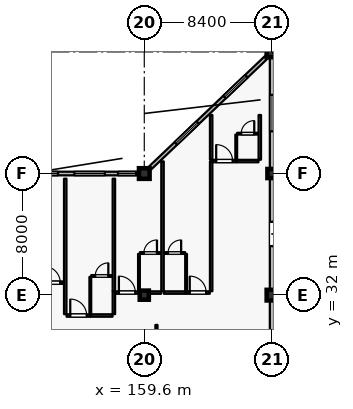
"""IFC4 building model, lengths in metres.
Left out: names, types, materials, properties, quantities, classifications, styles, units other than length and angle.
Written with IfcOpenShell. Run it as: python <this file> out.ifc"""

import sys

from ifc_helpers import new_model, si_unit, direction, frame, frame_2d, origin, origin_2d, place, context, subcontext, project, spatial, rectangle, extrude, element, fill, save


model = new_model("IFC4")
c1 = context("Model", 3, precision=1e-05, world=origin(), true_north=direction((0.0, 1.0)))
c2 = subcontext(c1, "Body", "Model", "MODEL_VIEW")
j1 = project(units=[si_unit("LENGTHUNIT", "METRE"), si_unit("PLANEANGLEUNIT", "RADIAN")], contexts=[c1])
p1 = place(None, origin())
s1 = spatial("IfcSite", under=j1, at=p1, CompositionType="ELEMENT")
p2 = place(p1, origin())
s2 = spatial("IfcBuilding", under=s1, at=p2, CompositionType="ELEMENT")
p3 = place(p2, frame((0.0, 0.0, 36.0)))
s3 = spatial("IfcBuildingStorey", under=s2, at=p3, CompositionType="ELEMENT", Elevation=36.0)
for number, where, z_axis, x_axis in (
    (1, (159.6, 40.0, 0.0), (0.0, 0.0, 1.0), (1.0, 0.0, 0.0)),
    (2, (168.0, 32.0, 0.0), (0.0, 0.0, 1.0), (1.0, 0.0, 0.0)),
    (3, (168.0, 48.0, 0.0), (0.0, 0.0, 1.0), (1.0, 0.0, 0.0)),
):
    element("IfcColumn", number, at=place(p3, frame(where, z_axis=z_axis, x_axis=x_axis)), inside=s3, PredefinedType="COLUMN", context=c2, shape_type="SweptSolid", body=[
        extrude(rectangle(XDim=0.7, YDim=0.7, at=origin_2d()), origin(), (0.0, 0.0, 1.0), 3.6),
    ])
for number, where, z_axis, x_axis in (
    (4, (159.6, 32.0, 0.0), (0.0, 0.0, 1.0), (1.0, 0.0, 0.0)),
    (5, (168.0, 40.0, 0.0), (0.0, 0.0, 1.0), (1.0, 0.0, 0.0)),
):
    element("IfcColumn", number, at=place(p3, frame(where, z_axis=z_axis, x_axis=x_axis)), inside=s3, PredefinedType="COLUMN", context=c2, shape_type="SweptSolid", body=[
        extrude(rectangle(XDim=0.6, YDim=0.6, at=origin_2d()), origin(), (0.0, 0.0, 1.0), 3.6),
    ])
p4 = place(p3, frame((151.55, 40.0, 0.0), z_axis=(0.0, 0.0, 1.0), x_axis=(1.0, 0.0, 0.0)))
e6 = element("IfcWall", 6, at=p4, inside=s3, PredefinedType="SOLIDWALL", context=c2, shape_type="SweptSolid", body=[
    extrude(rectangle(XDim=7.7, YDim=0.24, at=frame_2d((3.85, 0.0))), origin(), (0.0, 0.0, 1.0), 2.94),
])
p5 = place(p4, frame((0.375, 0.0, 0.8)))
e7 = element("IfcOpeningElement", 7, at=p5, cuts=e6, PredefinedType="OPENING", context=c2, shape_type="SweptSolid", body=[
    extrude(rectangle(XDim=2.0, YDim=1.75, at=frame_2d((1.0, 0.875))), frame((0.0, 0.13, 0.0), z_axis=(0.0, -1.0, 0.0), x_axis=(1.0, 0.0, 0.0)), (0.0, 0.0, 1.0), 0.26),
])
p6 = place(p4, frame((3.45, 0.0, 0.8)))
e8 = element("IfcOpeningElement", 8, at=p6, cuts=e6, PredefinedType="OPENING", context=c2, shape_type="SweptSolid", body=[
    extrude(rectangle(XDim=2.0, YDim=1.75, at=frame_2d((1.0, 0.875))), frame((0.0, 0.13, 0.0), z_axis=(0.0, -1.0, 0.0), x_axis=(1.0, 0.0, 0.0)), (0.0, 0.0, 1.0), 0.26),
])
p7 = place(p4, frame((6.325, 0.0, 0.8)))
e9 = element("IfcOpeningElement", 9, at=p7, cuts=e6, PredefinedType="OPENING", context=c2, shape_type="SweptSolid", body=[
    extrude(rectangle(XDim=1.2, YDim=1.5, at=frame_2d((0.6, 0.75))), frame((0.0, 0.13, 0.0), z_axis=(0.0, -1.0, 0.0), x_axis=(1.0, 0.0, 0.0)), (0.0, 0.0, 1.0), 0.26),
])
p8 = place(p3, frame((159.95, 40.333, 0.0), z_axis=(0.0, 0.0, 1.0), x_axis=(0.724105170588, 0.689689569247, 0.0)))
e10 = element("IfcWall", 10, at=p8, inside=s3, PredefinedType="SOLIDWALL", context=c2, shape_type="SweptSolid", body=[
    extrude(rectangle(XDim=10.634, YDim=0.24, at=frame_2d((5.317, 0.0))), origin(), (0.0, 0.0, 1.0), 2.94),
])
p9 = place(p8, frame((2.383, 0.0, 0.8)))
e11 = element("IfcOpeningElement", 11, at=p9, cuts=e10, PredefinedType="OPENING", context=c2, shape_type="SweptSolid", body=[
    extrude(rectangle(XDim=2.0, YDim=1.75, at=frame_2d((1.0, 0.875))), frame((0.0, 0.13, 0.0), z_axis=(0.0, -1.0, 0.0), x_axis=(1.0, 0.0, 0.0)), (0.0, 0.0, 1.0), 0.26),
])
p10 = place(p8, frame((6.803, 0.0, 0.8)))
e12 = element("IfcOpeningElement", 12, at=p10, cuts=e10, PredefinedType="OPENING", context=c2, shape_type="SweptSolid", body=[
    extrude(rectangle(XDim=2.0, YDim=1.75, at=frame_2d((1.0, 0.875))), frame((0.0, 0.13, 0.0), z_axis=(0.0, -1.0, 0.0), x_axis=(1.0, 0.0, 0.0)), (0.0, 0.0, 1.0), 0.26),
])
p11 = place(p3, frame((168.0, 47.65, 0.0), z_axis=(0.0, 0.0, 1.0), x_axis=(0.0, -1.0, 0.0)))
e13 = element("IfcWall", 13, at=p11, inside=s3, PredefinedType="SOLIDWALL", context=c2, shape_type="SweptSolid", body=[
    extrude(rectangle(XDim=7.35, YDim=0.28, at=frame_2d((3.675, 0.0))), origin(), (0.0, 0.0, 1.0), 2.7),
])
p12 = place(p11, frame((2.475, 0.0, 0.5)))
e14 = element("IfcOpeningElement", 14, at=p12, cuts=e13, PredefinedType="OPENING", context=c2, shape_type="SweptSolid", body=[
    extrude(rectangle(XDim=2.4, YDim=1.65, at=frame_2d((1.2, 0.825))), frame((0.0, 0.15, 0.0), z_axis=(0.0, -1.0, 0.0), x_axis=(1.0, 0.0, 0.0)), (0.0, 0.0, 1.0), 0.3),
])
p13 = place(p3, frame((168.0, 39.7, 0.0), z_axis=(0.0, 0.0, 1.0), x_axis=(0.0, -1.0, 0.0)))
e15 = element("IfcWall", 15, at=p13, inside=s3, PredefinedType="SOLIDWALL", context=c2, shape_type="SweptSolid", body=[
    extrude(rectangle(XDim=7.35, YDim=0.28, at=frame_2d((3.675, 0.0))), origin(), (0.0, 0.0, 1.0), 2.7),
])
p14 = place(p13, frame((2.875, 0.0, 0.0)))
e16 = element("IfcOpeningElement", 16, at=p14, cuts=e15, PredefinedType="OPENING", context=c2, shape_type="SweptSolid", body=[
    extrude(rectangle(XDim=1.6, YDim=2.25, at=frame_2d((0.8, 1.125))), frame((0.0, 0.15, 0.0), z_axis=(0.0, -1.0, 0.0), x_axis=(1.0, 0.0, 0.0)), (0.0, 0.0, 1.0), 0.3),
])
p15 = place(p3, frame((168.0, 31.65, 0.0), z_axis=(0.0, 0.0, 1.0), x_axis=(0.0, -1.0, 0.0)))
e17 = element("IfcWall", 17, at=p15, inside=s3, PredefinedType="SOLIDWALL", context=c2, shape_type="SweptSolid", body=[
    extrude(rectangle(XDim=7.35, YDim=0.28, at=frame_2d((3.675, 0.0))), origin(), (0.0, 0.0, 1.0), 2.7),
])
p16 = place(p15, frame((2.475, 0.0, 0.5)))
e18 = element("IfcOpeningElement", 18, at=p16, cuts=e17, PredefinedType="OPENING", context=c2, shape_type="SweptSolid", body=[
    extrude(rectangle(XDim=2.4, YDim=1.65, at=frame_2d((1.2, 0.825))), frame((0.0, 0.15, 0.0), z_axis=(0.0, -1.0, 0.0), x_axis=(1.0, 0.0, 0.0)), (0.0, 0.0, 1.0), 0.3),
])
p17 = place(p3, frame((152.75, 32.82, 0.0), z_axis=(0.0, 0.0, 1.0), x_axis=(1.0, 0.0, 0.0)))
e19 = element("IfcWall", 19, at=p17, inside=s3, PredefinedType="PARTITIONING", context=c2, shape_type="SweptSolid", body=[
    extrude(rectangle(XDim=1.56, YDim=0.16, at=frame_2d((0.78, 0.0))), origin(), (0.0, 0.0, 1.0), 3.365),
])
p18 = place(p17, frame((0.24, 0.0, 0.0)))
e20 = element("IfcOpeningElement", 20, at=p18, cuts=e19, PredefinedType="OPENING", context=c2, shape_type="SweptSolid", body=[
    extrude(rectangle(XDim=1.08, YDim=2.3, at=frame_2d((0.54, 1.15))), frame((0.0, 0.09, 0.0), z_axis=(0.0, -1.0, 0.0), x_axis=(1.0, 0.0, 0.0)), (0.0, 0.0, 1.0), 0.18),
])
p19 = place(p3, frame((154.49, 30.66, 0.0), z_axis=(0.0, 0.0, 1.0), x_axis=(1.0, 0.0, 0.0)))
e21 = element("IfcWall", 21, at=p19, inside=s3, PredefinedType="PARTITIONING", context=c2, shape_type="SweptSolid", body=[
    extrude(rectangle(XDim=1.56, YDim=0.16, at=frame_2d((0.78, 0.0))), origin(), (0.0, 0.0, 1.0), 3.365),
])
p20 = place(p19, frame((0.24, 0.0, 0.0)))
e22 = element("IfcOpeningElement", 22, at=p20, cuts=e21, PredefinedType="OPENING", context=c2, shape_type="SweptSolid", body=[
    extrude(rectangle(XDim=1.08, YDim=2.3, at=frame_2d((0.54, 1.15))), frame((0.0, 0.09, 0.0), z_axis=(0.0, -1.0, 0.0), x_axis=(1.0, 0.0, 0.0)), (0.0, 0.0, 1.0), 0.18),
])
p21 = place(p3, frame((156.06, 30.66, 0.0), z_axis=(0.0, 0.0, 1.0), x_axis=(1.0, 0.0, 0.0)))
e23 = element("IfcWall", 23, at=p21, inside=s3, PredefinedType="PARTITIONING", context=c2, shape_type="SweptSolid", body=[
    extrude(rectangle(XDim=1.45, YDim=0.16, at=frame_2d((0.725, 0.0))), origin(), (0.0, 0.0, 1.0), 3.365),
])
p22 = place(p3, frame((156.05, 30.75, 0.0), z_axis=(0.0, 0.0, 1.0), x_axis=(0.0, 1.0, 0.0)))
e24 = element("IfcWall", 24, at=p22, inside=s3, PredefinedType="PARTITIONING", context=c2, shape_type="SweptSolid", body=[
    extrude(rectangle(XDim=2.45, YDim=0.115, at=frame_2d((1.225, 0.0))), origin(), (0.0, 0.0, 1.0), 3.365),
])
p23 = place(p3, frame((156.11, 33.26, 0.0), z_axis=(0.0, 0.0, 1.0), x_axis=(1.0, 0.0, 0.0)))
e25 = element("IfcWall", 25, at=p23, inside=s3, PredefinedType="PARTITIONING", context=c2, shape_type="SweptSolid", body=[
    extrude(rectangle(XDim=1.39, YDim=0.115, at=frame_2d((0.695, 0.0))), origin(), (0.0, 0.0, 1.0), 3.365),
])
p24 = place(p23, frame((0.265, 0.0, 0.0)))
e26 = element("IfcOpeningElement", 26, at=p24, cuts=e25, PredefinedType="OPENING", context=c2, shape_type="SweptSolid", body=[
    extrude(rectangle(XDim=0.86, YDim=2.12, at=frame_2d((0.43, 1.06))), frame((0.0, 0.067, 0.0), z_axis=(0.0, -1.0, 0.0), x_axis=(1.0, 0.0, 0.0)), (0.0, 0.0, 1.0), 0.135),
])
p25 = place(p3, frame((154.4, 30.75, 0.0), z_axis=(0.0, 0.0, 1.0), x_axis=(0.0, 1.0, 0.0)))
e27 = element("IfcWall", 27, at=p25, inside=s3, PredefinedType="PARTITIONING", context=c2, shape_type="SweptSolid", body=[
    extrude(rectangle(XDim=8.91, YDim=0.16, at=frame_2d((4.455, 0.0))), origin(), (0.0, 0.0, 1.0), 3.365),
])
p26 = place(p3, frame((157.6, 30.75, 0.0), z_axis=(0.0, 0.0, 1.0), x_axis=(0.0, 1.0, 0.0)))
e28 = element("IfcWall", 28, at=p26, inside=s3, PredefinedType="PARTITIONING", context=c2, shape_type="SweptSolid", body=[
    extrude(rectangle(XDim=1.5, YDim=0.16, at=frame_2d((0.75, 0.0))), origin(), (0.0, 0.0, 1.0), 3.365),
])
p27 = place(p3, frame((157.69, 32.17, 0.0), z_axis=(0.0, 0.0, 1.0), x_axis=(1.0, 0.0, 0.0)))
e29 = element("IfcWall", 29, at=p27, inside=s3, PredefinedType="PARTITIONING", context=c2, shape_type="SweptSolid", body=[
    extrude(rectangle(XDim=1.56, YDim=0.16, at=frame_2d((0.78, 0.0))), origin(), (0.0, 0.0, 1.0), 2.84),
])
p28 = place(p27, frame((0.24, 0.0, 0.0)))
e30 = element("IfcOpeningElement", 30, at=p28, cuts=e29, PredefinedType="OPENING", context=c2, shape_type="SweptSolid", body=[
    extrude(rectangle(XDim=1.08, YDim=2.3, at=frame_2d((0.54, 1.15))), frame((0.0, 0.09, 0.0), z_axis=(0.0, -1.0, 0.0), x_axis=(1.0, 0.0, 0.0)), (0.0, 0.0, 1.0), 0.18),
])
p29 = place(p3, frame((159.26, 32.17, 0.0), z_axis=(0.0, 0.0, 1.0), x_axis=(1.0, 0.0, 0.0)))
e31 = element("IfcWall", 31, at=p29, inside=s3, PredefinedType="PARTITIONING", context=c2, shape_type="SweptSolid", body=[
    extrude(rectangle(XDim=1.45, YDim=0.16, at=frame_2d((0.725, 0.0))), origin(), (0.0, 0.0, 1.0), 3.365),
])
p30 = place(p3, frame((159.25, 32.26, 0.0), z_axis=(0.0, 0.0, 1.0), x_axis=(0.0, 1.0, 0.0)))
e32 = element("IfcWall", 32, at=p30, inside=s3, PredefinedType="PARTITIONING", context=c2, shape_type="SweptSolid", body=[
    extrude(rectangle(XDim=2.45, YDim=0.115, at=frame_2d((1.225, 0.0))), origin(), (0.0, 0.0, 1.0), 3.365),
])
p31 = place(p3, frame((159.31, 34.77, 0.0), z_axis=(0.0, 0.0, 1.0), x_axis=(1.0, 0.0, 0.0)))
e33 = element("IfcWall", 33, at=p31, inside=s3, PredefinedType="PARTITIONING", context=c2, shape_type="SweptSolid", body=[
    extrude(rectangle(XDim=1.39, YDim=0.115, at=frame_2d((0.695, 0.0))), origin(), (0.0, 0.0, 1.0), 3.365),
])
p32 = place(p31, frame((0.265, 0.0, 0.0)))
e34 = element("IfcOpeningElement", 34, at=p32, cuts=e33, PredefinedType="OPENING", context=c2, shape_type="SweptSolid", body=[
    extrude(rectangle(XDim=0.86, YDim=2.12, at=frame_2d((0.43, 1.06))), frame((0.0, 0.067, 0.0), z_axis=(0.0, -1.0, 0.0), x_axis=(1.0, 0.0, 0.0)), (0.0, 0.0, 1.0), 0.135),
])
p33 = place(p3, frame((157.6, 32.26, 0.0), z_axis=(0.0, 0.0, 1.0), x_axis=(0.0, 1.0, 0.0)))
e35 = element("IfcWall", 35, at=p33, inside=s3, PredefinedType="PARTITIONING", context=c2, shape_type="SweptSolid", body=[
    extrude(rectangle(XDim=7.4, YDim=0.16, at=frame_2d((3.7, 0.0))), origin(), (0.0, 0.0, 1.0), 3.365),
])
p34 = place(p3, frame((160.89, 32.17, 0.0), z_axis=(0.0, 0.0, 1.0), x_axis=(1.0, 0.0, 0.0)))
e36 = element("IfcWall", 36, at=p34, inside=s3, PredefinedType="PARTITIONING", context=c2, shape_type="SweptSolid", body=[
    extrude(rectangle(XDim=1.45, YDim=0.16, at=frame_2d((0.725, 0.0))), origin(), (0.0, 0.0, 1.0), 3.365),
])
p35 = place(p3, frame((162.35, 32.17, 0.0), z_axis=(0.0, 0.0, 1.0), x_axis=(1.0, 0.0, 0.0)))
e37 = element("IfcWall", 37, at=p35, inside=s3, PredefinedType="PARTITIONING", context=c2, shape_type="SweptSolid", body=[
    extrude(rectangle(XDim=1.56, YDim=0.16, at=frame_2d((0.78, 0.0))), origin(), (0.0, 0.0, 1.0), 3.365),
])
p36 = place(p35, frame((0.24, 0.0, 0.0)))
e38 = element("IfcOpeningElement", 38, at=p36, cuts=e37, PredefinedType="OPENING", context=c2, shape_type="SweptSolid", body=[
    extrude(rectangle(XDim=1.08, YDim=2.3, at=frame_2d((0.54, 1.15))), frame((0.0, 0.09, 0.0), z_axis=(0.0, -1.0, 0.0), x_axis=(1.0, 0.0, 0.0)), (0.0, 0.0, 1.0), 0.18),
])
p37 = place(p3, frame((162.35, 32.26, 0.0), z_axis=(0.0, 0.0, 1.0), x_axis=(0.0, 1.0, 0.0)))
e39 = element("IfcWall", 39, at=p37, inside=s3, PredefinedType="PARTITIONING", context=c2, shape_type="SweptSolid", body=[
    extrude(rectangle(XDim=2.45, YDim=0.115, at=frame_2d((1.225, 0.0))), origin(), (0.0, 0.0, 1.0), 3.365),
])
p38 = place(p3, frame((160.9, 34.77, 0.0), z_axis=(0.0, 0.0, 1.0), x_axis=(1.0, 0.0, 0.0)))
e40 = element("IfcWall", 40, at=p38, inside=s3, PredefinedType="PARTITIONING", context=c2, shape_type="SweptSolid", body=[
    extrude(rectangle(XDim=1.39, YDim=0.115, at=frame_2d((0.695, 0.0))), origin(), (0.0, 0.0, 1.0), 3.365),
])
p39 = place(p38, frame((0.265, 0.0, 0.0)))
e41 = element("IfcOpeningElement", 41, at=p39, cuts=e40, PredefinedType="OPENING", context=c2, shape_type="SweptSolid", body=[
    extrude(rectangle(XDim=0.86, YDim=2.12, at=frame_2d((0.43, 1.06))), frame((0.0, 0.067, 0.0), z_axis=(0.0, -1.0, 0.0), x_axis=(1.0, 0.0, 0.0)), (0.0, 0.0, 1.0), 0.135),
])
for number, where, z_axis, x_axis in (
    (42, (160.8, 32.26, 0.0), (0.0, 0.0, 1.0), (0.0, 1.0, 0.0)),
    (43, (164.0, 32.26, 0.0), (0.0, 0.0, 1.0), (0.0, 1.0, 0.0)),
):
    element("IfcWall", number, at=place(p3, frame(where, z_axis=z_axis, x_axis=x_axis)), inside=s3, PredefinedType="PARTITIONING", context=c2, shape_type="SweptSolid", body=[
        extrude(rectangle(XDim=8.54, YDim=0.16, at=frame_2d((4.27, 0.0))), origin(), (0.0, 0.0, 1.0), 3.365),
    ])
p40 = place(p3, frame((164.09, 40.82, 0.0), z_axis=(0.0, 0.0, 1.0), x_axis=(1.0, 0.0, 0.0)))
e44 = element("IfcWall", 44, at=p40, inside=s3, PredefinedType="PARTITIONING", context=c2, shape_type="SweptSolid", body=[
    extrude(rectangle(XDim=1.56, YDim=0.16, at=frame_2d((0.78, 0.0))), origin(), (0.0, 0.0, 1.0), 3.365),
])
p41 = place(p40, frame((0.24, 0.0, 0.0)))
e45 = element("IfcOpeningElement", 45, at=p41, cuts=e44, PredefinedType="OPENING", context=c2, shape_type="SweptSolid", body=[
    extrude(rectangle(XDim=1.08, YDim=2.3, at=frame_2d((0.54, 1.15))), frame((0.0, 0.09, 0.0), z_axis=(0.0, -1.0, 0.0), x_axis=(1.0, 0.0, 0.0)), (0.0, 0.0, 1.0), 0.18),
])
p42 = place(p3, frame((165.66, 40.82, 0.0), z_axis=(0.0, 0.0, 1.0), x_axis=(1.0, 0.0, 0.0)))
e46 = element("IfcWall", 46, at=p42, inside=s3, PredefinedType="PARTITIONING", context=c2, shape_type="SweptSolid", body=[
    extrude(rectangle(XDim=1.45, YDim=0.16, at=frame_2d((0.725, 0.0))), origin(), (0.0, 0.0, 1.0), 3.365),
])
p43 = place(p3, frame((165.65, 40.91, 0.0), z_axis=(0.0, 0.0, 1.0), x_axis=(0.0, 1.0, 0.0)))
e47 = element("IfcWall", 47, at=p43, inside=s3, PredefinedType="PARTITIONING", context=c2, shape_type="SweptSolid", body=[
    extrude(rectangle(XDim=1.65, YDim=0.115, at=frame_2d((0.825, 0.0))), origin(), (0.0, 0.0, 1.0), 3.365),
])
p44 = place(p3, frame((165.71, 42.62, 0.0), z_axis=(0.0, 0.0, 1.0), x_axis=(1.0, 0.0, 0.0)))
e48 = element("IfcWall", 48, at=p44, inside=s3, PredefinedType="PARTITIONING", context=c2, shape_type="SweptSolid", body=[
    extrude(rectangle(XDim=1.39, YDim=0.115, at=frame_2d((0.695, 0.0))), origin(), (0.0, 0.0, 1.0), 3.365),
])
p45 = place(p44, frame((0.265, 0.0, 0.0)))
e49 = element("IfcOpeningElement", 49, at=p45, cuts=e48, PredefinedType="OPENING", context=c2, shape_type="SweptSolid", body=[
    extrude(rectangle(XDim=0.86, YDim=2.12, at=frame_2d((0.43, 1.06))), frame((0.0, 0.067, 0.0), z_axis=(0.0, -1.0, 0.0), x_axis=(1.0, 0.0, 0.0)), (0.0, 0.0, 1.0), 0.135),
])
for number, where, z_axis, x_axis in (
    (50, (164.0, 40.91, 0.0), (0.0, 0.0, 1.0), (0.0, 1.0, 0.0)),
    (51, (167.2, 40.91, 0.0), (0.0, 0.0, 1.0), (0.0, 1.0, 0.0)),
):
    element("IfcWall", number, at=place(p3, frame(where, z_axis=z_axis, x_axis=x_axis)), inside=s3, PredefinedType="PARTITIONING", context=c2, shape_type="SweptSolid", body=[
        extrude(rectangle(XDim=2.94, YDim=0.16, at=frame_2d((1.47, 0.0))), origin(), (0.0, 0.0, 1.0), 3.365),
    ])
p46 = place(p3, frame((160.4, 24.96, 0.0), z_axis=(0.0, 0.0, 1.0), x_axis=(0.0, 1.0, 0.0)))
e52 = element("IfcWall", 52, at=p46, inside=s3, PredefinedType="PARTITIONING", context=c2, shape_type="SweptSolid", body=[
    extrude(rectangle(XDim=5.08, YDim=0.14, at=frame_2d((2.54, 0.0))), origin(), (0.0, 0.0, 1.0), 3.365),
])
p47 = place(p46, frame((1.59, 0.0, 0.0)))
e53 = element("IfcOpeningElement", 53, at=p47, cuts=e52, PredefinedType="OPENING", context=c2, shape_type="SweptSolid", body=[
    extrude(rectangle(XDim=1.9, YDim=2.4, at=frame_2d((0.95, 1.2))), frame((0.0, 0.08, 0.0), z_axis=(0.0, -1.0, 0.0), x_axis=(1.0, 0.0, 0.0)), (0.0, 0.0, 1.0), 0.16),
])
p48 = place(p5, origin())
e54 = element("IfcWindow", 54, at=p48, inside=s3, PartitioningType="DOUBLE_PANEL_VERTICAL", PredefinedType="WINDOW", context=c2, shape_type="SweptSolid", body=[
    extrude(rectangle(XDim=2.0, YDim=1.75, at=frame_2d((1.0, 0.875))), frame((0.0, 0.03, 0.0), z_axis=(0.0, -1.0, 0.0), x_axis=(1.0, 0.0, 0.0)), (0.0, 0.0, 1.0), 0.06),
])
fill(e7, e54)
p49 = place(p6, origin())
e55 = element("IfcWindow", 55, at=p49, inside=s3, PartitioningType="DOUBLE_PANEL_VERTICAL", PredefinedType="WINDOW", context=c2, shape_type="SweptSolid", body=[
    extrude(rectangle(XDim=2.0, YDim=1.75, at=frame_2d((1.0, 0.875))), frame((0.0, 0.03, 0.0), z_axis=(0.0, -1.0, 0.0), x_axis=(1.0, 0.0, 0.0)), (0.0, 0.0, 1.0), 0.06),
])
fill(e8, e55)
p50 = place(p7, origin())
e56 = element("IfcWindow", 56, at=p50, inside=s3, PartitioningType="SINGLE_PANEL", PredefinedType="WINDOW", context=c2, shape_type="SweptSolid", body=[
    extrude(rectangle(XDim=1.2, YDim=1.5, at=frame_2d((0.6, 0.75))), frame((0.0, 0.03, 0.0), z_axis=(0.0, -1.0, 0.0), x_axis=(1.0, 0.0, 0.0)), (0.0, 0.0, 1.0), 0.06),
])
fill(e9, e56)
p51 = place(p9, origin())
e57 = element("IfcWindow", 57, at=p51, inside=s3, PartitioningType="DOUBLE_PANEL_VERTICAL", PredefinedType="WINDOW", context=c2, shape_type="SweptSolid", body=[
    extrude(rectangle(XDim=2.0, YDim=1.75, at=frame_2d((1.0, 0.875))), frame((0.0, 0.03, 0.0), z_axis=(0.0, -1.0, 0.0), x_axis=(1.0, 0.0, 0.0)), (0.0, 0.0, 1.0), 0.06),
])
fill(e11, e57)
p52 = place(p10, origin())
e58 = element("IfcWindow", 58, at=p52, inside=s3, PartitioningType="DOUBLE_PANEL_VERTICAL", PredefinedType="WINDOW", context=c2, shape_type="SweptSolid", body=[
    extrude(rectangle(XDim=2.0, YDim=1.75, at=frame_2d((1.0, 0.875))), frame((0.0, 0.03, 0.0), z_axis=(0.0, -1.0, 0.0), x_axis=(1.0, 0.0, 0.0)), (0.0, 0.0, 1.0), 0.06),
])
fill(e12, e58)
p53 = place(p12, origin())
e59 = element("IfcWindow", 59, at=p53, inside=s3, PartitioningType="DOUBLE_PANEL_VERTICAL", PredefinedType="WINDOW", context=c2, shape_type="SweptSolid", body=[
    extrude(rectangle(XDim=2.4, YDim=1.65, at=frame_2d((1.2, 0.825))), frame((0.0, 0.03, 0.0), z_axis=(0.0, -1.0, 0.0), x_axis=(1.0, 0.0, 0.0)), (0.0, 0.0, 1.0), 0.06),
])
fill(e14, e59)
p54 = place(p14, origin())
e60 = element("IfcDoor", 60, at=p54, inside=s3, OperationType="DOUBLE_DOOR_SINGLE_SWING", PredefinedType="DOOR", context=c2, shape_type="SweptSolid", body=[
    extrude(rectangle(XDim=1.6, YDim=2.25, at=frame_2d((0.8, 1.125))), frame((0.0, 0.025, 0.0), z_axis=(0.0, -1.0, 0.0), x_axis=(1.0, 0.0, 0.0)), (0.0, 0.0, 1.0), 0.05),
])
fill(e16, e60)
p55 = place(p18, origin())
e61 = element("IfcDoor", 61, at=p55, inside=s3, OperationType="SINGLE_SWING_LEFT", PredefinedType="DOOR", context=c2, shape_type="SweptSolid", body=[
    extrude(rectangle(XDim=1.08, YDim=2.3, at=frame_2d((0.54, 1.15))), frame((0.0, 0.025, 0.0), z_axis=(0.0, -1.0, 0.0), x_axis=(1.0, 0.0, 0.0)), (0.0, 0.0, 1.0), 0.05),
])
fill(e20, e61)
p56 = place(p20, origin())
e62 = element("IfcDoor", 62, at=p56, inside=s3, OperationType="SINGLE_SWING_LEFT", PredefinedType="DOOR", context=c2, shape_type="SweptSolid", body=[
    extrude(rectangle(XDim=1.08, YDim=2.3, at=frame_2d((0.54, 1.15))), frame((0.0, 0.025, 0.0), z_axis=(0.0, -1.0, 0.0), x_axis=(1.0, 0.0, 0.0)), (0.0, 0.0, 1.0), 0.05),
])
fill(e22, e62)
p57 = place(p24, origin())
e63 = element("IfcDoor", 63, at=p57, inside=s3, OperationType="SINGLE_SWING_RIGHT", PredefinedType="DOOR", context=c2, shape_type="SweptSolid", body=[
    extrude(rectangle(XDim=0.86, YDim=2.12, at=frame_2d((0.43, 1.06))), frame((0.0, 0.025, 0.0), z_axis=(0.0, -1.0, 0.0), x_axis=(1.0, 0.0, 0.0)), (0.0, 0.0, 1.0), 0.05),
])
fill(e26, e63)
p58 = place(p28, origin())
e64 = element("IfcDoor", 64, at=p58, inside=s3, OperationType="SINGLE_SWING_LEFT", PredefinedType="DOOR", context=c2, shape_type="SweptSolid", body=[
    extrude(rectangle(XDim=1.08, YDim=2.3, at=frame_2d((0.54, 1.15))), frame((0.0, 0.025, 0.0), z_axis=(0.0, -1.0, 0.0), x_axis=(1.0, 0.0, 0.0)), (0.0, 0.0, 1.0), 0.05),
])
fill(e30, e64)
p59 = place(p32, origin())
e65 = element("IfcDoor", 65, at=p59, inside=s3, OperationType="SINGLE_SWING_RIGHT", PredefinedType="DOOR", context=c2, shape_type="SweptSolid", body=[
    extrude(rectangle(XDim=0.86, YDim=2.12, at=frame_2d((0.43, 1.06))), frame((0.0, 0.025, 0.0), z_axis=(0.0, -1.0, 0.0), x_axis=(1.0, 0.0, 0.0)), (0.0, 0.0, 1.0), 0.05),
])
fill(e34, e65)
p60 = place(p36, origin())
e66 = element("IfcDoor", 66, at=p60, inside=s3, OperationType="SINGLE_SWING_LEFT", PredefinedType="DOOR", context=c2, shape_type="SweptSolid", body=[
    extrude(rectangle(XDim=1.08, YDim=2.3, at=frame_2d((0.54, 1.15))), frame((0.0, 0.025, 0.0), z_axis=(0.0, -1.0, 0.0), x_axis=(1.0, 0.0, 0.0)), (0.0, 0.0, 1.0), 0.05),
])
fill(e38, e66)
p61 = place(p39, origin())
e67 = element("IfcDoor", 67, at=p61, inside=s3, OperationType="SINGLE_SWING_RIGHT", PredefinedType="DOOR", context=c2, shape_type="SweptSolid", body=[
    extrude(rectangle(XDim=0.86, YDim=2.12, at=frame_2d((0.43, 1.06))), frame((0.0, 0.025, 0.0), z_axis=(0.0, -1.0, 0.0), x_axis=(1.0, 0.0, 0.0)), (0.0, 0.0, 1.0), 0.05),
])
fill(e41, e67)
p62 = place(p41, origin())
e68 = element("IfcDoor", 68, at=p62, inside=s3, OperationType="SINGLE_SWING_LEFT", PredefinedType="DOOR", context=c2, shape_type="SweptSolid", body=[
    extrude(rectangle(XDim=1.08, YDim=2.3, at=frame_2d((0.54, 1.15))), frame((0.0, 0.025, 0.0), z_axis=(0.0, -1.0, 0.0), x_axis=(1.0, 0.0, 0.0)), (0.0, 0.0, 1.0), 0.05),
])
fill(e45, e68)
p63 = place(p45, origin())
e69 = element("IfcDoor", 69, at=p63, inside=s3, OperationType="SINGLE_SWING_RIGHT", PredefinedType="DOOR", context=c2, shape_type="SweptSolid", body=[
    extrude(rectangle(XDim=0.86, YDim=2.12, at=frame_2d((0.43, 1.06))), frame((0.0, 0.025, 0.0), z_axis=(0.0, -1.0, 0.0), x_axis=(1.0, 0.0, 0.0)), (0.0, 0.0, 1.0), 0.05),
])
fill(e49, e69)
save(model, sys.argv[1])
